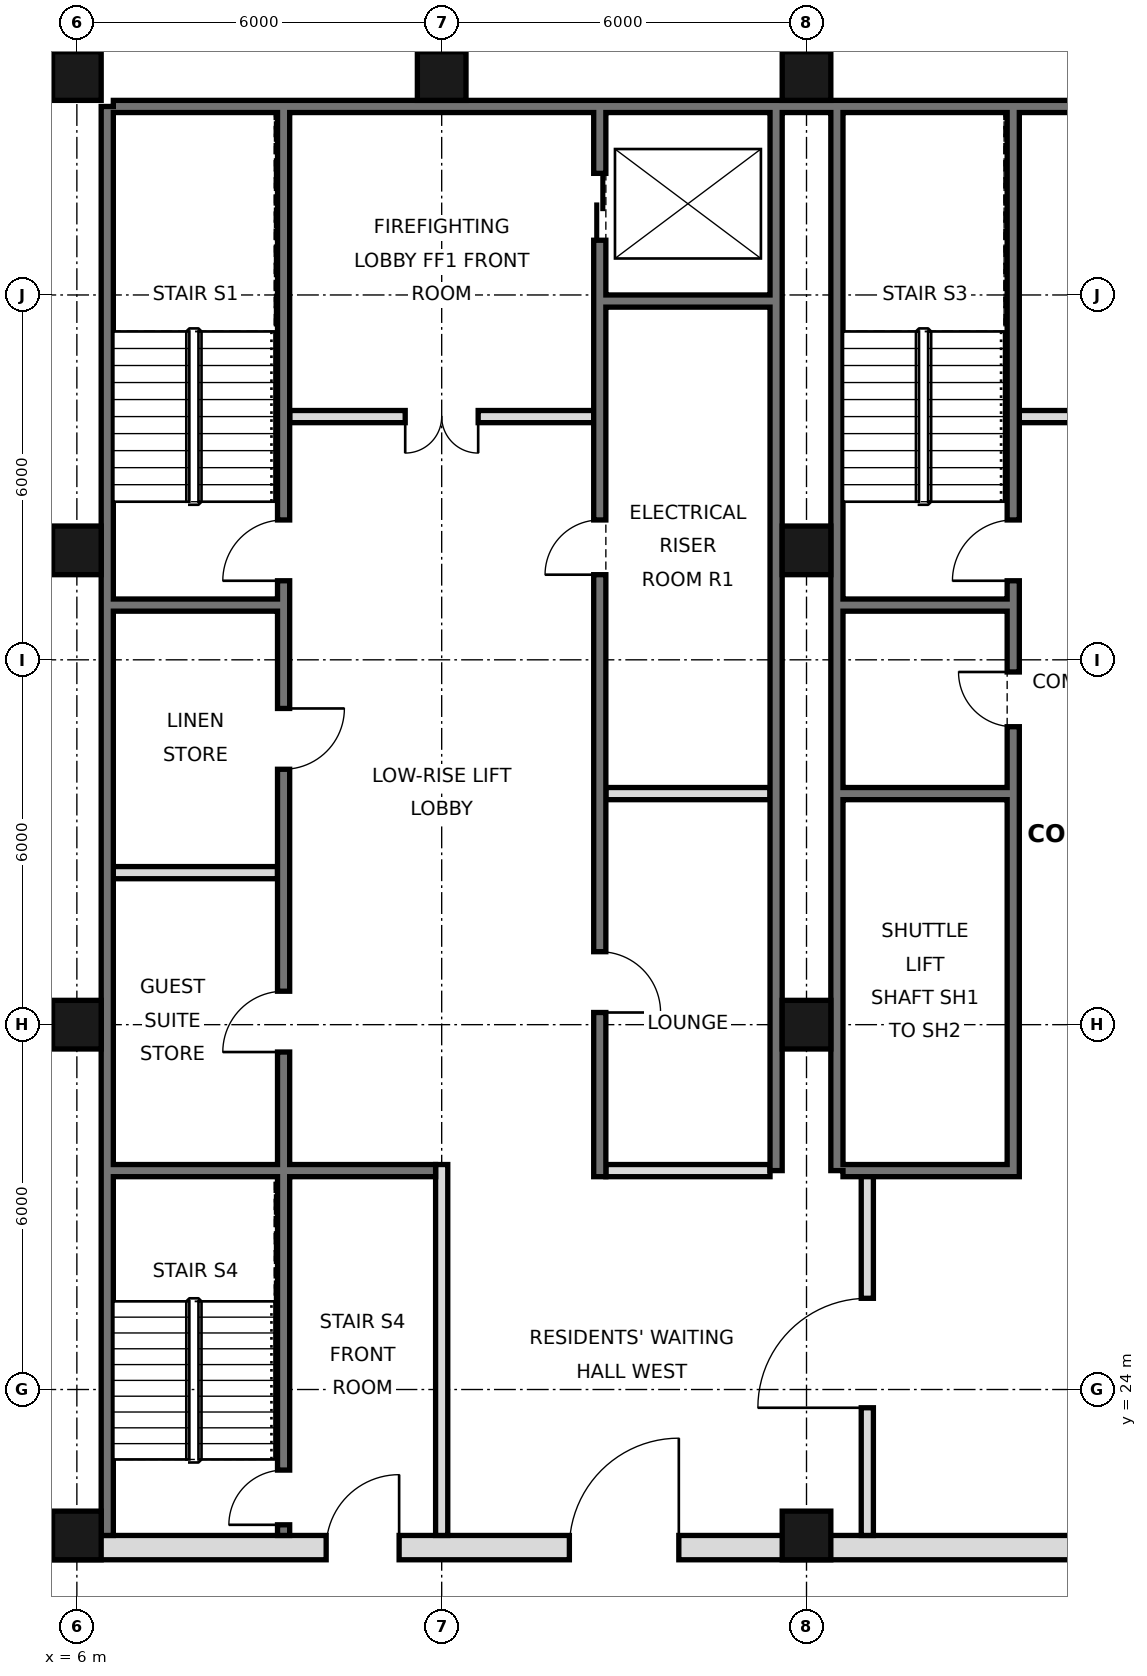
"""IFC4 building model, lengths in metres.
Left out: names, types, materials, properties, quantities, classifications, styles, units other than length and angle.
Written with IfcOpenShell. Run it as: python <this file> out.ifc"""

import sys

from ifc_helpers import new_model, si_unit, direction, frame, frame_2d, origin, origin_2d, place, context, subcontext, project, spatial, rectangle, hollow_rectangle, extrude, element, fill, save


model = new_model("IFC4")
c1 = context("Model", 3, precision=1e-05, world=origin(), true_north=direction((0.0, 1.0)))
c2 = subcontext(c1, "Body", "Model", "MODEL_VIEW")
j1 = project(units=[si_unit("LENGTHUNIT", "METRE"), si_unit("PLANEANGLEUNIT", "RADIAN")], contexts=[c1])
p1 = place(None, origin())
s1 = spatial("IfcSite", under=j1, at=p1, CompositionType="ELEMENT")
p2 = place(p1, origin())
s2 = spatial("IfcBuilding", under=s1, at=p2, CompositionType="ELEMENT")
p3 = place(p2, frame((0.0, 0.0, 170.8)))
s3 = spatial("IfcBuildingStorey", under=s2, at=p3, CompositionType="ELEMENT", Elevation=170.8)
for number, where, z_axis, x_axis in (
    (1, (6.0, 21.6, 0.0), (0.0, 0.0, 1.0), (1.0, 0.0, 0.0)),
    (2, (6.0, 30.0, 0.0), (0.0, 0.0, 1.0), (1.0, 0.0, 0.0)),
    (3, (6.0, 37.8, 0.0), (0.0, 0.0, 1.0), (1.0, 0.0, 0.0)),
    (4, (6.0, 45.6, 0.0), (0.0, 0.0, 1.0), (1.0, 0.0, 0.0)),
    (5, (12.0, 45.6, 0.0), (0.0, 0.0, 1.0), (1.0, 0.0, 0.0)),
    (6, (18.0, 21.6, 0.0), (0.0, 0.0, 1.0), (1.0, 0.0, 0.0)),
    (7, (18.0, 30.0, 0.0), (0.0, 0.0, 1.0), (1.0, 0.0, 0.0)),
    (8, (18.0, 37.8, 0.0), (0.0, 0.0, 1.0), (1.0, 0.0, 0.0)),
    (9, (18.0, 45.6, 0.0), (0.0, 0.0, 1.0), (1.0, 0.0, 0.0)),
):
    element("IfcColumn", number, at=place(p3, frame(where, z_axis=z_axis, x_axis=x_axis)), inside=s3, PredefinedType="COLUMN", context=c2, shape_type="SweptSolid", body=[
        extrude(hollow_rectangle(XDim=0.8, YDim=0.8, WallThickness=0.045, at=origin_2d()), origin(), (0.0, 0.0, 1.0), 3.6),
    ])
p4 = place(p3, frame((6.5, 21.6, 0.0), z_axis=(0.0, 0.0, 1.0), x_axis=(0.0, 1.0, 0.0)))
e10 = element("IfcWall", 10, at=p4, inside=s3, PredefinedType="SOLIDWALL", context=c2, shape_type="SweptSolid", body=[
    extrude(rectangle(XDim=23.5, YDim=0.2, at=frame_2d((11.75, 0.0))), origin(), (0.0, 0.0, 1.0), 3.42),
])
p5 = place(p3, frame((6.6, 45.1, 0.0), z_axis=(0.0, 0.0, 1.0), x_axis=(1.0, 0.0, 0.0)))
e11 = element("IfcWall", 11, at=p5, inside=s3, PredefinedType="SOLIDWALL", context=c2, shape_type="SweptSolid", body=[
    extrude(rectangle(XDim=34.8, YDim=0.2, at=frame_2d((17.4, 0.0))), origin(), (0.0, 0.0, 1.0), 3.42),
])
for number, where, z_axis, x_axis in (
    (12, (17.5, 27.6, 0.0), (0.0, 0.0, 1.0), (0.0, 1.0, 0.0)),
    (13, (18.5, 27.6, 0.0), (0.0, 0.0, 1.0), (0.0, 1.0, 0.0)),
):
    element("IfcWall", number, at=place(p3, frame(where, z_axis=z_axis, x_axis=x_axis)), inside=s3, PredefinedType="SOLIDWALL", context=c2, shape_type="SweptSolid", body=[
        extrude(rectangle(XDim=17.5, YDim=0.2, at=frame_2d((8.75, 0.0))), origin(), (0.0, 0.0, 1.0), 3.42),
    ])
p6 = place(p3, frame((5.6, 21.4, 0.0), z_axis=(0.0, 0.0, 1.0), x_axis=(1.0, 0.0, 0.0)))
e14 = element("IfcWall", 14, at=p6, inside=s3, PredefinedType="SOLIDWALL", context=c2, shape_type="SweptSolid", body=[
    extrude(rectangle(XDim=36.8, YDim=0.4, at=frame_2d((18.4, 0.0))), origin(), (0.0, 0.0, 1.0), 3.42),
])
p7 = place(p6, frame((8.5, 0.0, 0.0)))
e15 = element("IfcOpeningElement", 15, at=p7, cuts=e14, PredefinedType="OPENING", context=c2, shape_type="SweptSolid", body=[
    extrude(rectangle(XDim=1.8, YDim=2.1, at=frame_2d((0.9, 1.05))), frame((0.0, 0.21, 0.0), z_axis=(0.0, -1.0, 0.0), x_axis=(1.0, 0.0, 0.0)), (0.0, 0.0, 1.0), 0.42),
])
p8 = place(p6, frame((17.5, 0.0, 0.0)))
e16 = element("IfcOpeningElement", 16, at=p8, cuts=e14, PredefinedType="OPENING", context=c2, shape_type="SweptSolid", body=[
    extrude(rectangle(XDim=1.8, YDim=2.1, at=frame_2d((0.9, 1.05))), frame((0.0, 0.21, 0.0), z_axis=(0.0, -1.0, 0.0), x_axis=(1.0, 0.0, 0.0)), (0.0, 0.0, 1.0), 0.42),
])
p9 = place(p6, frame((26.5, 0.0, 0.0)))
e17 = element("IfcOpeningElement", 17, at=p9, cuts=e14, PredefinedType="OPENING", context=c2, shape_type="SweptSolid", body=[
    extrude(rectangle(XDim=1.8, YDim=2.1, at=frame_2d((0.9, 1.05))), frame((0.0, 0.21, 0.0), z_axis=(0.0, -1.0, 0.0), x_axis=(1.0, 0.0, 0.0)), (0.0, 0.0, 1.0), 0.42),
])
p10 = place(p6, frame((4.5, 0.0, 0.0)))
e18 = element("IfcOpeningElement", 18, at=p10, cuts=e14, PredefinedType="OPENING", context=c2, shape_type="SweptSolid", body=[
    extrude(rectangle(XDim=1.2, YDim=2.1, at=frame_2d((0.6, 1.05))), frame((0.0, 0.21, 0.0), z_axis=(0.0, -1.0, 0.0), x_axis=(1.0, 0.0, 0.0)), (0.0, 0.0, 1.0), 0.42),
])
p11 = place(p6, frame((31.1, 0.0, 0.0)))
e19 = element("IfcOpeningElement", 19, at=p11, cuts=e14, PredefinedType="OPENING", context=c2, shape_type="SweptSolid", body=[
    extrude(rectangle(XDim=1.2, YDim=2.1, at=frame_2d((0.6, 1.05))), frame((0.0, 0.21, 0.0), z_axis=(0.0, -1.0, 0.0), x_axis=(1.0, 0.0, 0.0)), (0.0, 0.0, 1.0), 0.42),
])
p12 = place(p3, frame((19.0, 21.6, 0.0), z_axis=(0.0, 0.0, 1.0), x_axis=(0.0, 1.0, 0.0)))
e20 = element("IfcWall", 20, at=p12, inside=s3, PredefinedType="PARTITIONING", context=c2, shape_type="SweptSolid", body=[
    extrude(rectangle(XDim=6.0, YDim=0.2, at=frame_2d((3.0, 0.0))), origin(), (0.0, 0.0, 1.0), 3.42),
])
p13 = place(p12, frame((2.1, 0.0, 0.0)))
e21 = element("IfcOpeningElement", 21, at=p13, cuts=e20, PredefinedType="OPENING", context=c2, shape_type="SweptSolid", body=[
    extrude(rectangle(XDim=1.8, YDim=2.1, at=frame_2d((0.9, 1.05))), frame((0.0, 0.11, 0.0), z_axis=(0.0, -1.0, 0.0), x_axis=(1.0, 0.0, 0.0)), (0.0, 0.0, 1.0), 0.22),
])
p14 = place(p3, frame((12.0, 21.6, 0.0), z_axis=(0.0, 0.0, 1.0), x_axis=(0.0, 1.0, 0.0)))
e22 = element("IfcWall", 22, at=p14, inside=s3, PredefinedType="PARTITIONING", context=c2, shape_type="SweptSolid", body=[
    extrude(rectangle(XDim=6.1, YDim=0.2, at=frame_2d((3.05, 0.0))), origin(), (0.0, 0.0, 1.0), 3.42),
])
p15 = place(p3, frame((14.6, 27.5, 0.0), z_axis=(0.0, 0.0, 1.0), x_axis=(0.0, 1.0, 0.0)))
e23 = element("IfcWall", 23, at=p15, inside=s3, PredefinedType="SOLIDWALL", context=c2, shape_type="SweptSolid", body=[
    extrude(rectangle(XDim=17.5, YDim=0.2, at=frame_2d((8.75, 0.0))), origin(), (0.0, 0.0, 1.0), 3.42),
])
p16 = place(p15, frame((15.4, 0.0, 0.0)))
e24 = element("IfcOpeningElement", 24, at=p16, cuts=e23, PredefinedType="OPENING", context=c2, shape_type="SweptSolid", body=[
    extrude(rectangle(XDim=1.1, YDim=2.1, at=frame_2d((0.55, 1.05))), frame((0.0, 0.11, 0.0), z_axis=(0.0, -1.0, 0.0), x_axis=(1.0, 0.0, 0.0)), (0.0, 0.0, 1.0), 0.22),
])
p17 = place(p15, frame((2.7, 0.0, 0.0)))
e25 = element("IfcOpeningElement", 25, at=p17, cuts=e23, PredefinedType="OPENING", context=c2, shape_type="SweptSolid", body=[
    extrude(rectangle(XDim=1.0, YDim=2.1, at=frame_2d((0.5, 1.05))), frame((0.0, 0.11, 0.0), z_axis=(0.0, -1.0, 0.0), x_axis=(1.0, 0.0, 0.0)), (0.0, 0.0, 1.0), 0.22),
])
p18 = place(p15, frame((9.9, 0.0, 0.0)))
e26 = element("IfcOpeningElement", 26, at=p18, cuts=e23, PredefinedType="OPENING", context=c2, shape_type="SweptSolid", body=[
    extrude(rectangle(XDim=0.9, YDim=2.1, at=frame_2d((0.45, 1.05))), frame((0.0, 0.11, 0.0), z_axis=(0.0, -1.0, 0.0), x_axis=(1.0, 0.0, 0.0)), (0.0, 0.0, 1.0), 0.22),
])
p19 = place(p3, frame((21.4, 27.5, 0.0), z_axis=(0.0, 0.0, 1.0), x_axis=(0.0, 1.0, 0.0)))
e27 = element("IfcWall", 27, at=p19, inside=s3, PredefinedType="SOLIDWALL", context=c2, shape_type="SweptSolid", body=[
    extrude(rectangle(XDim=17.5, YDim=0.2, at=frame_2d((8.75, 0.0))), origin(), (0.0, 0.0, 1.0), 3.42),
])
p20 = place(p19, frame((9.8, 0.0, 0.0)))
e28 = element("IfcOpeningElement", 28, at=p20, cuts=e27, PredefinedType="OPENING", context=c2, shape_type="SweptSolid", body=[
    extrude(rectangle(XDim=1.0, YDim=2.1, at=frame_2d((0.5, 1.05))), frame((0.0, 0.11, 0.0), z_axis=(0.0, -1.0, 0.0), x_axis=(1.0, 0.0, 0.0)), (0.0, 0.0, 1.0), 0.22),
])
p21 = place(p19, frame((7.4, 0.0, 0.0)))
e29 = element("IfcOpeningElement", 29, at=p21, cuts=e27, PredefinedType="OPENING", context=c2, shape_type="SweptSolid", body=[
    extrude(rectangle(XDim=0.9, YDim=2.1, at=frame_2d((0.45, 1.05))), frame((0.0, 0.11, 0.0), z_axis=(0.0, -1.0, 0.0), x_axis=(1.0, 0.0, 0.0)), (0.0, 0.0, 1.0), 0.22),
])
p22 = place(p3, frame((9.4, 21.6, 0.0), z_axis=(0.0, 0.0, 1.0), x_axis=(0.0, 1.0, 0.0)))
e30 = element("IfcWall", 30, at=p22, inside=s3, PredefinedType="SOLIDWALL", context=c2, shape_type="SweptSolid", body=[
    extrude(rectangle(XDim=23.4, YDim=0.2, at=frame_2d((11.7, 0.0))), origin(), (0.0, 0.0, 1.0), 3.42),
])
p23 = place(p22, frame((7.95, 0.0, 0.0)))
e31 = element("IfcOpeningElement", 31, at=p23, cuts=e30, PredefinedType="OPENING", context=c2, shape_type="SweptSolid", body=[
    extrude(rectangle(XDim=1.0, YDim=2.1, at=frame_2d((0.5, 1.05))), frame((0.0, 0.11, 0.0), z_axis=(0.0, -1.0, 0.0), x_axis=(1.0, 0.0, 0.0)), (0.0, 0.0, 1.0), 0.22),
])
p24 = place(p22, frame((12.6, 0.0, 0.0)))
e32 = element("IfcOpeningElement", 32, at=p24, cuts=e30, PredefinedType="OPENING", context=c2, shape_type="SweptSolid", body=[
    extrude(rectangle(XDim=1.0, YDim=2.1, at=frame_2d((0.5, 1.05))), frame((0.0, 0.11, 0.0), z_axis=(0.0, -1.0, 0.0), x_axis=(1.0, 0.0, 0.0)), (0.0, 0.0, 1.0), 0.22),
])
p25 = place(p22, frame((15.7, 0.0, 0.0)))
e33 = element("IfcOpeningElement", 33, at=p25, cuts=e30, PredefinedType="OPENING", context=c2, shape_type="SweptSolid", body=[
    extrude(rectangle(XDim=1.0, YDim=2.1, at=frame_2d((0.5, 1.05))), frame((0.0, 0.11, 0.0), z_axis=(0.0, -1.0, 0.0), x_axis=(1.0, 0.0, 0.0)), (0.0, 0.0, 1.0), 0.22),
])
p26 = place(p22, frame((0.175, 0.0, 0.0)))
e34 = element("IfcOpeningElement", 34, at=p26, cuts=e30, PredefinedType="OPENING", context=c2, shape_type="SweptSolid", body=[
    extrude(rectangle(XDim=0.9, YDim=2.1, at=frame_2d((0.45, 1.05))), frame((0.0, 0.11, 0.0), z_axis=(0.0, -1.0, 0.0), x_axis=(1.0, 0.0, 0.0)), (0.0, 0.0, 1.0), 0.22),
])
p27 = place(p3, frame((14.7, 27.6, 0.0), z_axis=(0.0, 0.0, 1.0), x_axis=(1.0, 0.0, 0.0)))
e35 = element("IfcWall", 35, at=p27, inside=s3, PredefinedType="PARTITIONING", context=c2, shape_type="SweptSolid", body=[
    extrude(rectangle(XDim=2.7, YDim=0.2, at=frame_2d((1.35, 0.0))), origin(), (0.0, 0.0, 1.0), 3.42),
])
p28 = place(p3, frame((18.6, 27.6, 0.0), z_axis=(0.0, 0.0, 1.0), x_axis=(1.0, 0.0, 0.0)))
e36 = element("IfcWall", 36, at=p28, inside=s3, PredefinedType="SOLIDWALL", context=c2, shape_type="SweptSolid", body=[
    extrude(rectangle(XDim=2.7, YDim=0.2, at=frame_2d((1.35, 0.0))), origin(), (0.0, 0.0, 1.0), 3.42),
])
p29 = place(p3, frame((6.6, 27.6, 0.0), z_axis=(0.0, 0.0, 1.0), x_axis=(1.0, 0.0, 0.0)))
e37 = element("IfcWall", 37, at=p29, inside=s3, PredefinedType="SOLIDWALL", context=c2, shape_type="SweptSolid", body=[
    extrude(rectangle(XDim=5.3, YDim=0.2, at=frame_2d((2.65, 0.0))), origin(), (0.0, 0.0, 1.0), 3.42),
])
p30 = place(p3, frame((6.6, 32.5, 0.0), z_axis=(0.0, 0.0, 1.0), x_axis=(1.0, 0.0, 0.0)))
e38 = element("IfcWall", 38, at=p30, inside=s3, PredefinedType="PARTITIONING", context=c2, shape_type="SweptSolid", body=[
    extrude(rectangle(XDim=2.7, YDim=0.2, at=frame_2d((1.35, 0.0))), origin(), (0.0, 0.0, 1.0), 3.42),
])
for number, where, z_axis, x_axis in (
    (39, (14.7, 33.8, 0.0), (0.0, 0.0, 1.0), (1.0, 0.0, 0.0)),
    (40, (18.6, 33.8, 0.0), (0.0, 0.0, 1.0), (1.0, 0.0, 0.0)),
    (41, (18.6, 36.9, 0.0), (0.0, 0.0, 1.0), (1.0, 0.0, 0.0)),
    (42, (6.6, 36.9, 0.0), (0.0, 0.0, 1.0), (1.0, 0.0, 0.0)),
):
    element("IfcWall", number, at=place(p3, frame(where, z_axis=z_axis, x_axis=x_axis)), inside=s3, PredefinedType="SOLIDWALL", context=c2, shape_type="SweptSolid", body=[
        extrude(rectangle(XDim=2.7, YDim=0.2, at=frame_2d((1.35, 0.0))), origin(), (0.0, 0.0, 1.0), 3.42),
    ])
p31 = place(p3, frame((21.5, 40.0, 0.0), z_axis=(0.0, 0.0, 1.0), x_axis=(1.0, 0.0, 0.0)))
e43 = element("IfcWall", 43, at=p31, inside=s3, PredefinedType="PARTITIONING", context=c2, shape_type="SweptSolid", body=[
    extrude(rectangle(XDim=5.0, YDim=0.2, at=frame_2d((2.5, 0.0))), origin(), (0.0, 0.0, 1.0), 3.42),
])
p32 = place(p31, frame((1.9, 0.0, 0.0)))
e44 = element("IfcOpeningElement", 44, at=p32, cuts=e43, PredefinedType="OPENING", context=c2, shape_type="SweptSolid", body=[
    extrude(rectangle(XDim=1.2, YDim=2.1, at=frame_2d((0.6, 1.05))), frame((0.0, 0.11, 0.0), z_axis=(0.0, -1.0, 0.0), x_axis=(1.0, 0.0, 0.0)), (0.0, 0.0, 1.0), 0.22),
])
p33 = place(p3, frame((9.5, 40.0, 0.0), z_axis=(0.0, 0.0, 1.0), x_axis=(1.0, 0.0, 0.0)))
e45 = element("IfcWall", 45, at=p33, inside=s3, PredefinedType="PARTITIONING", context=c2, shape_type="SweptSolid", body=[
    extrude(rectangle(XDim=5.0, YDim=0.2, at=frame_2d((2.5, 0.0))), origin(), (0.0, 0.0, 1.0), 3.42),
])
p34 = place(p33, frame((1.9, 0.0, 0.0)))
e46 = element("IfcOpeningElement", 46, at=p34, cuts=e45, PredefinedType="OPENING", context=c2, shape_type="SweptSolid", body=[
    extrude(rectangle(XDim=1.2, YDim=2.1, at=frame_2d((0.6, 1.05))), frame((0.0, 0.11, 0.0), z_axis=(0.0, -1.0, 0.0), x_axis=(1.0, 0.0, 0.0)), (0.0, 0.0, 1.0), 0.22),
])
p35 = place(p3, frame((14.7, 41.9, 0.0), z_axis=(0.0, 0.0, 1.0), x_axis=(1.0, 0.0, 0.0)))
e47 = element("IfcWall", 47, at=p35, inside=s3, PredefinedType="SOLIDWALL", context=c2, shape_type="SweptSolid", body=[
    extrude(rectangle(XDim=2.7, YDim=0.2, at=frame_2d((1.35, 0.0))), origin(), (0.0, 0.0, 1.0), 3.42),
])
p36 = place(p7, frame((1.8, 0.0, 0.0), z_axis=(0.0, 0.0, 1.0), x_axis=(-1.0, 0.0, 0.0)))
e48 = element("IfcDoor", 48, at=p36, inside=s3, OperationType="SINGLE_SWING_LEFT", PredefinedType="DOOR", context=c2, shape_type="SweptSolid", body=[
    extrude(rectangle(XDim=1.8, YDim=2.1, at=frame_2d((0.9, 1.05))), frame((0.0, 0.025, 0.0), z_axis=(0.0, -1.0, 0.0), x_axis=(1.0, 0.0, 0.0)), (0.0, 0.0, 1.0), 0.05),
])
fill(e15, e48)
p37 = place(p13, origin())
e49 = element("IfcDoor", 49, at=p37, inside=s3, OperationType="SINGLE_SWING_LEFT", PredefinedType="DOOR", context=c2, shape_type="SweptSolid", body=[
    extrude(rectangle(XDim=1.8, YDim=2.1, at=frame_2d((0.9, 1.05))), frame((0.0, 0.025, 0.0), z_axis=(0.0, -1.0, 0.0), x_axis=(1.0, 0.0, 0.0)), (0.0, 0.0, 1.0), 0.05),
])
fill(e21, e49)
p38 = place(p10, frame((1.2, 0.0, 0.0), z_axis=(0.0, 0.0, 1.0), x_axis=(-1.0, 0.0, 0.0)))
e50 = element("IfcDoor", 50, at=p38, inside=s3, OperationType="SINGLE_SWING_LEFT", PredefinedType="DOOR", context=c2, shape_type="SweptSolid", body=[
    extrude(rectangle(XDim=1.2, YDim=2.1, at=frame_2d((0.6, 1.05))), frame((0.0, 0.025, 0.0), z_axis=(0.0, -1.0, 0.0), x_axis=(1.0, 0.0, 0.0)), (0.0, 0.0, 1.0), 0.05),
])
fill(e18, e50)
p39 = place(p34, frame((1.2, 0.0, 0.0), z_axis=(0.0, 0.0, 1.0), x_axis=(-1.0, 0.0, 0.0)))
e51 = element("IfcDoor", 51, at=p39, inside=s3, OperationType="DOUBLE_DOOR_SINGLE_SWING", PredefinedType="DOOR", context=c2, shape_type="SweptSolid", body=[
    extrude(rectangle(XDim=1.2, YDim=2.1, at=frame_2d((0.6, 1.05))), frame((0.0, 0.025, 0.0), z_axis=(0.0, -1.0, 0.0), x_axis=(1.0, 0.0, 0.0)), (0.0, 0.0, 1.0), 0.05),
])
fill(e46, e51)
p40 = place(p16, origin())
e52 = element("IfcDoor", 52, at=p40, inside=s3, OperationType="DOUBLE_DOOR_SLIDING", PredefinedType="DOOR", context=c2, shape_type="SweptSolid", body=[
    extrude(rectangle(XDim=1.1, YDim=2.1, at=frame_2d((0.55, 1.05))), frame((0.0, 0.025, 0.0), z_axis=(0.0, -1.0, 0.0), x_axis=(1.0, 0.0, 0.0)), (0.0, 0.0, 1.0), 0.05),
])
fill(e24, e52)
p41 = place(p17, frame((1.0, 0.0, 0.0), z_axis=(0.0, 0.0, 1.0), x_axis=(-1.0, 0.0, 0.0)))
e53 = element("IfcDoor", 53, at=p41, inside=s3, OperationType="SINGLE_SWING_RIGHT", PredefinedType="DOOR", context=c2, shape_type="SweptSolid", body=[
    extrude(rectangle(XDim=1.0, YDim=2.1, at=frame_2d((0.5, 1.05))), frame((0.0, 0.025, 0.0), z_axis=(0.0, -1.0, 0.0), x_axis=(1.0, 0.0, 0.0)), (0.0, 0.0, 1.0), 0.05),
])
fill(e25, e53)
p42 = place(p23, origin())
e54 = element("IfcDoor", 54, at=p42, inside=s3, OperationType="SINGLE_SWING_LEFT", PredefinedType="DOOR", context=c2, shape_type="SweptSolid", body=[
    extrude(rectangle(XDim=1.0, YDim=2.1, at=frame_2d((0.5, 1.05))), frame((0.0, 0.025, 0.0), z_axis=(0.0, -1.0, 0.0), x_axis=(1.0, 0.0, 0.0)), (0.0, 0.0, 1.0), 0.05),
])
fill(e31, e54)
p43 = place(p24, origin())
e55 = element("IfcDoor", 55, at=p43, inside=s3, OperationType="SINGLE_SWING_RIGHT", PredefinedType="DOOR", context=c2, shape_type="SweptSolid", body=[
    extrude(rectangle(XDim=1.0, YDim=2.1, at=frame_2d((0.5, 1.05))), frame((0.0, 0.025, 0.0), z_axis=(0.0, -1.0, 0.0), x_axis=(1.0, 0.0, 0.0)), (0.0, 0.0, 1.0), 0.05),
])
fill(e32, e55)
p44 = place(p25, origin())
e56 = element("IfcDoor", 56, at=p44, inside=s3, OperationType="SINGLE_SWING_LEFT", PredefinedType="DOOR", context=c2, shape_type="SweptSolid", body=[
    extrude(rectangle(XDim=1.0, YDim=2.1, at=frame_2d((0.5, 1.05))), frame((0.0, 0.025, 0.0), z_axis=(0.0, -1.0, 0.0), x_axis=(1.0, 0.0, 0.0)), (0.0, 0.0, 1.0), 0.05),
])
fill(e33, e56)
p45 = place(p20, origin())
e57 = element("IfcDoor", 57, at=p45, inside=s3, OperationType="SINGLE_SWING_LEFT", PredefinedType="DOOR", context=c2, shape_type="SweptSolid", body=[
    extrude(rectangle(XDim=1.0, YDim=2.1, at=frame_2d((0.5, 1.05))), frame((0.0, 0.025, 0.0), z_axis=(0.0, -1.0, 0.0), x_axis=(1.0, 0.0, 0.0)), (0.0, 0.0, 1.0), 0.05),
])
fill(e28, e57)
p46 = place(p26, origin())
e58 = element("IfcDoor", 58, at=p46, inside=s3, OperationType="SINGLE_SWING_LEFT", PredefinedType="DOOR", context=c2, shape_type="SweptSolid", body=[
    extrude(rectangle(XDim=0.9, YDim=2.1, at=frame_2d((0.45, 1.05))), frame((0.0, 0.025, 0.0), z_axis=(0.0, -1.0, 0.0), x_axis=(1.0, 0.0, 0.0)), (0.0, 0.0, 1.0), 0.05),
])
fill(e34, e58)
p47 = place(p18, origin())
e59 = element("IfcDoor", 59, at=p47, inside=s3, OperationType="SINGLE_SWING_LEFT", PredefinedType="DOOR", context=c2, shape_type="SweptSolid", body=[
    extrude(rectangle(XDim=0.9, YDim=2.1, at=frame_2d((0.45, 1.05))), frame((0.0, 0.025, 0.0), z_axis=(0.0, -1.0, 0.0), x_axis=(1.0, 0.0, 0.0)), (0.0, 0.0, 1.0), 0.05),
])
fill(e26, e59)
p48 = place(p21, frame((0.9, 0.0, 0.0), z_axis=(0.0, 0.0, 1.0), x_axis=(-1.0, 0.0, 0.0)))
e60 = element("IfcDoor", 60, at=p48, inside=s3, OperationType="SINGLE_SWING_LEFT", PredefinedType="DOOR", context=c2, shape_type="SweptSolid", body=[
    extrude(rectangle(XDim=0.9, YDim=2.1, at=frame_2d((0.45, 1.05))), frame((0.0, 0.025, 0.0), z_axis=(0.0, -1.0, 0.0), x_axis=(1.0, 0.0, 0.0)), (0.0, 0.0, 1.0), 0.05),
])
fill(e29, e60)
save(model, sys.argv[1])
